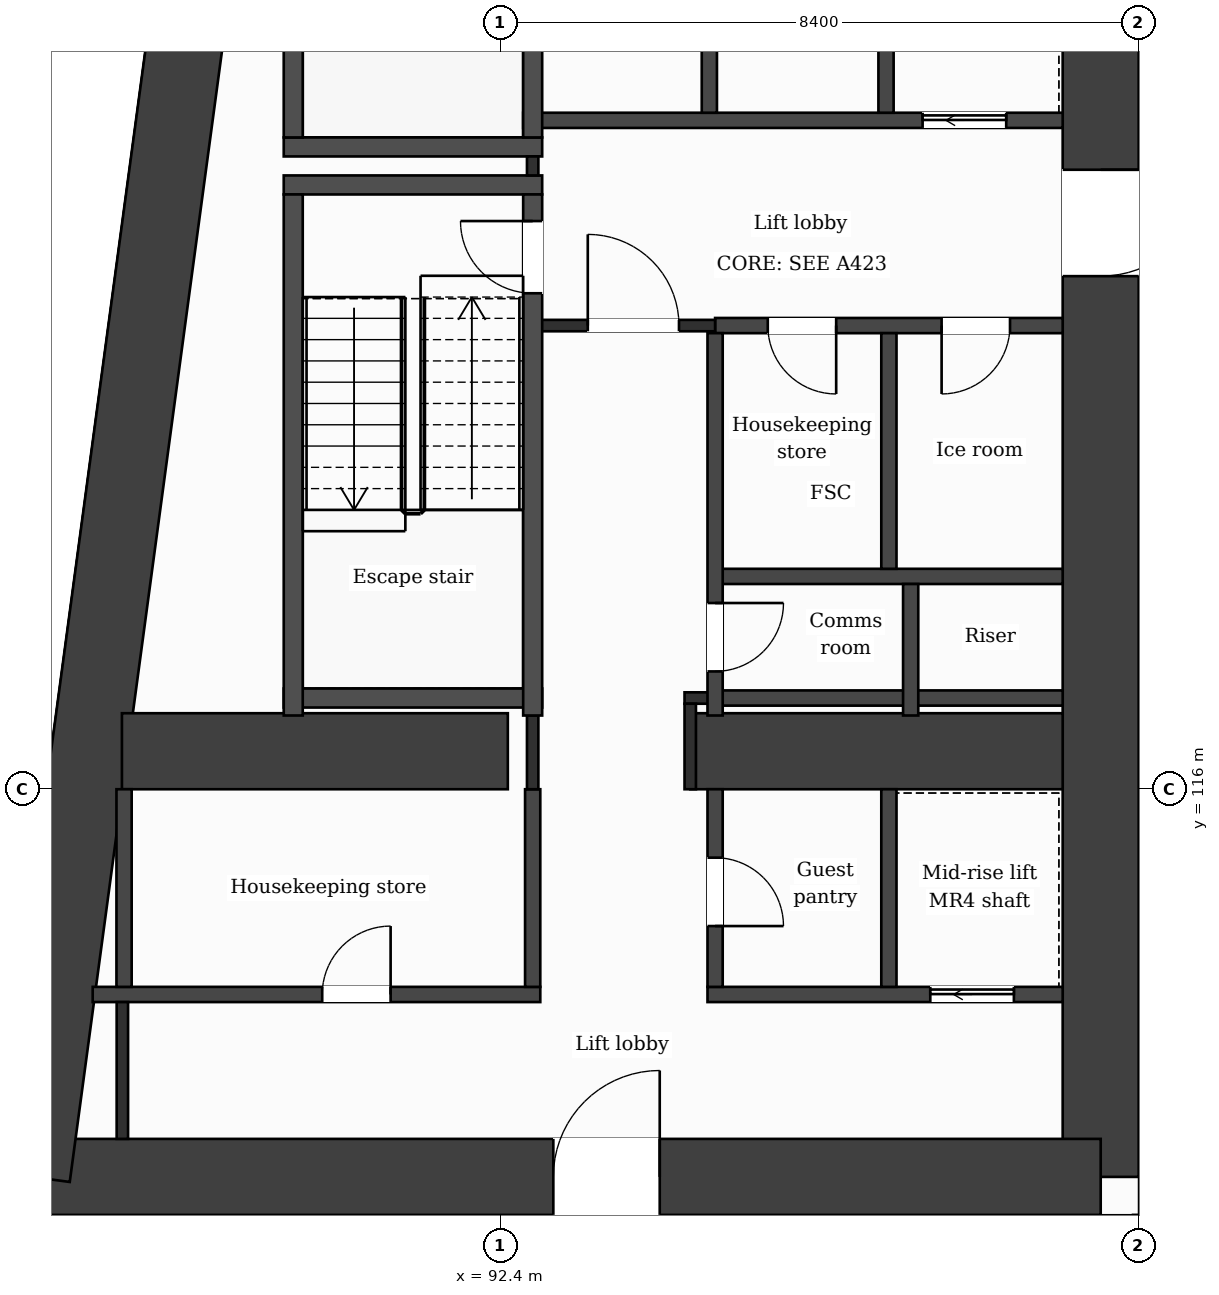
"""IFC4 building model, lengths in metres.
Left out: names, types, materials, properties, quantities, classifications, styles, units other than length and angle.
Written with IfcOpenShell. Run it as: python <this file> out.ifc"""

import sys

from ifc_helpers import new_model, si_unit, direction, frame, frame_2d, origin, place, context, subcontext, project, spatial, rectangle, extrude, element, fill, save


model = new_model("IFC4")
c1 = context("Model", 3, precision=1e-05, world=origin(), true_north=direction((0.0, 1.0)))
c2 = subcontext(c1, "Body", "Model", "MODEL_VIEW")
j1 = project(units=[si_unit("LENGTHUNIT", "METRE"), si_unit("PLANEANGLEUNIT", "RADIAN")], contexts=[c1])
p1 = place(None, origin())
s1 = spatial("IfcSite", under=j1, at=p1, CompositionType="ELEMENT")
p2 = place(p1, origin())
s2 = spatial("IfcBuilding", under=s1, at=p2, CompositionType="ELEMENT")
p3 = place(p2, frame((0.0, 0.0, 98.4)))
s3 = spatial("IfcBuildingStorey", under=s2, at=p3, CompositionType="ELEMENT", Elevation=98.4)
p4 = place(p3, frame((100.3, 131.9, 0.0), z_axis=(0.0, 0.0, 1.0), x_axis=(0.0, -1.0, 0.0)))
e1 = element("IfcWall", 1, at=p4, inside=s3, PredefinedType="SHEAR", context=c2, shape_type="SweptSolid", body=[
    extrude(rectangle(XDim=21.0, YDim=1.0, at=frame_2d((10.5, 0.0))), origin(), (0.0, 0.0, 1.0), 3.7),
])
p5 = place(p4, frame((7.75, 0.0, 0.0)))
e2 = element("IfcOpeningElement", 2, at=p5, cuts=e1, PredefinedType="OPENING", context=c2, shape_type="SweptSolid", body=[
    extrude(rectangle(XDim=1.4, YDim=2.1, at=frame_2d((0.7, 1.05))), frame((0.0, 0.51, 0.0), z_axis=(0.0, -1.0, 0.0), x_axis=(1.0, 0.0, 0.0)), (0.0, 0.0, 1.0), 1.02),
])
p6 = place(p3, frame((100.3, 110.9, 0.0), z_axis=(0.0, 0.0, 1.0), x_axis=(-1.0, 0.0, 0.0)))
e3 = element("IfcWall", 3, at=p6, inside=s3, PredefinedType="SHEAR", context=c2, shape_type="SweptSolid", body=[
    extrude(rectangle(XDim=14.059, YDim=1.0, at=frame_2d((7.03, 0.0))), origin(), (0.0, 0.0, 1.0), 3.7),
])
p7 = place(p6, frame((5.802, 0.0, 0.0)))
e4 = element("IfcOpeningElement", 4, at=p7, cuts=e3, PredefinedType="OPENING", context=c2, shape_type="SweptSolid", body=[
    extrude(rectangle(XDim=1.4, YDim=2.1, at=frame_2d((0.7, 1.05))), frame((0.0, 0.51, 0.0), z_axis=(0.0, -1.0, 0.0), x_axis=(1.0, 0.0, 0.0)), (0.0, 0.0, 1.0), 1.02),
])
p8 = place(p3, frame((86.241, 110.9, 0.0), z_axis=(0.0, 0.0, 1.0), x_axis=(0.133411141623, 0.991060778808, 0.0)))
e5 = element("IfcWall", 5, at=p8, inside=s3, PredefinedType="SHEAR", context=c2, shape_type="SweptSolid", body=[
    extrude(rectangle(XDim=21.189, YDim=1.0, at=frame_2d((10.595, 0.0))), origin(), (0.0, 0.0, 1.0), 3.7),
])
p9 = place(p3, frame((87.423, 116.5, 0.0), z_axis=(0.0, 0.0, 1.0), x_axis=(1.0, 0.0, 0.0)))
e6 = element("IfcWall", 6, at=p9, inside=s3, PredefinedType="SHEAR", context=c2, shape_type="SweptSolid", body=[
    extrude(rectangle(XDim=5.077, YDim=1.0, at=frame_2d((2.539, 0.0))), origin(), (0.0, 0.0, 1.0), 3.7),
])
p10 = place(p3, frame((94.9, 116.5, 0.0), z_axis=(0.0, 0.0, 1.0), x_axis=(1.0, 0.0, 0.0)))
e7 = element("IfcWall", 7, at=p10, inside=s3, PredefinedType="SHEAR", context=c2, shape_type="SweptSolid", body=[
    extrude(rectangle(XDim=4.9, YDim=1.0, at=frame_2d((2.45, 0.0))), origin(), (0.0, 0.0, 1.0), 3.7),
])
p11 = place(p3, frame((87.334, 110.4, 0.0), z_axis=(0.0, 0.0, 1.0), x_axis=(-0.133437175554, -0.991057273915, 0.0)))
e8 = element("IfcWall", 8, at=p11, inside=s3, PredefinedType="SOLIDWALL", context=c2, shape_type="SweptSolid", body=[
    extrude(rectangle(XDim=6.781, YDim=0.3, at=frame_2d((3.39, 0.0))), origin(), (0.0, 0.0, 1.0), 3.38),
])
p12 = place(p11, frame((1.418, 0.0, 0.0)))
e9 = element("IfcOpeningElement", 9, at=p12, cuts=e8, PredefinedType="OPENING", context=c2, shape_type="SweptSolid", body=[
    extrude(rectangle(XDim=1.2, YDim=2.4, at=frame_2d((0.6, 1.2))), frame((0.0, 0.16, 0.0), z_axis=(0.0, -1.0, 0.0), x_axis=(1.0, 0.0, 0.0)), (0.0, 0.0, 1.0), 0.32),
])
p13 = place(p11, frame((4.758, 0.0, 0.9)))
e10 = element("IfcOpeningElement", 10, at=p13, cuts=e8, PredefinedType="OPENING", context=c2, shape_type="SweptSolid", body=[
    extrude(rectangle(XDim=1.2, YDim=2.1, at=frame_2d((0.6, 1.05))), frame((0.0, 0.16, 0.0), z_axis=(0.0, -1.0, 0.0), x_axis=(1.0, 0.0, 0.0)), (0.0, 0.0, 1.0), 0.32),
])
p14 = place(p3, frame((87.039, 113.3, 0.0), z_axis=(0.0, 0.0, 1.0), x_axis=(1.0, 0.0, 0.0)))
e11 = element("IfcWall", 11, at=p14, inside=s3, PredefinedType="PARTITIONING", context=c2, shape_type="SweptSolid", body=[
    extrude(rectangle(XDim=5.888, YDim=0.2, at=frame_2d((2.944, 0.0))), origin(), (0.0, 0.0, 1.0), 3.38),
])
p15 = place(p14, frame((3.019, 0.0, 0.0)))
e12 = element("IfcOpeningElement", 12, at=p15, cuts=e11, PredefinedType="OPENING", context=c2, shape_type="SweptSolid", body=[
    extrude(rectangle(XDim=0.9, YDim=2.1, at=frame_2d((0.45, 1.05))), frame((0.0, 0.11, 0.0), z_axis=(0.0, -1.0, 0.0), x_axis=(1.0, 0.0, 0.0)), (0.0, 0.0, 1.0), 0.22),
])
p16 = place(p3, frame((95.127, 113.3, 0.0), z_axis=(0.0, 0.0, 1.0), x_axis=(1.0, 0.0, 0.0)))
e13 = element("IfcWall", 13, at=p16, inside=s3, PredefinedType="PARTITIONING", context=c2, shape_type="SweptSolid", body=[
    extrude(rectangle(XDim=4.673, YDim=0.2, at=frame_2d((2.336, 0.0))), origin(), (0.0, 0.0, 1.0), 3.38),
])
p17 = place(p16, frame((2.931, 0.0, 0.0)))
e14 = element("IfcOpeningElement", 14, at=p17, cuts=e13, PredefinedType="OPENING", context=c2, shape_type="SweptSolid", body=[
    extrude(rectangle(XDim=1.1, YDim=2.1, at=frame_2d((0.55, 1.05))), frame((0.0, 0.11, 0.0), z_axis=(0.0, -1.0, 0.0), x_axis=(1.0, 0.0, 0.0)), (0.0, 0.0, 1.0), 0.22),
])
p18 = place(p3, frame((95.227, 117.2, 0.0), z_axis=(0.0, 0.0, 1.0), x_axis=(1.0, 0.0, 0.0)))
e15 = element("IfcWall", 15, at=p18, inside=s3, PredefinedType="PARTITIONING", context=c2, shape_type="SweptSolid", body=[
    extrude(rectangle(XDim=4.573, YDim=0.2, at=frame_2d((2.287, 0.0))), origin(), (0.0, 0.0, 1.0), 3.38),
])
p19 = place(p3, frame((94.825, 117.2, 0.0), z_axis=(0.0, 0.0, 1.0), x_axis=(1.0, 0.0, 0.0)))
e16 = element("IfcWall", 16, at=p19, inside=s3, PredefinedType="PARTITIONING", context=c2, shape_type="SweptSolid", body=[
    extrude(rectangle(XDim=0.402, YDim=0.15, at=frame_2d((0.201, 0.0))), origin(), (0.0, 0.0, 1.0), 3.38),
])
p20 = place(p3, frame((89.552, 117.2, 0.0), z_axis=(0.0, 0.0, 1.0), x_axis=(1.0, 0.0, 0.0)))
e17 = element("IfcWall", 17, at=p20, inside=s3, PredefinedType="PARTITIONING", context=c2, shape_type="SweptSolid", body=[
    extrude(rectangle(XDim=3.4, YDim=0.25, at=frame_2d((1.7, 0.0))), origin(), (0.0, 0.0, 1.0), 3.38),
])
p21 = place(p3, frame((95.227, 118.8, 0.0), z_axis=(0.0, 0.0, 1.0), x_axis=(1.0, 0.0, 0.0)))
e18 = element("IfcWall", 18, at=p21, inside=s3, PredefinedType="PARTITIONING", context=c2, shape_type="SweptSolid", body=[
    extrude(rectangle(XDim=4.573, YDim=0.2, at=frame_2d((2.287, 0.0))), origin(), (0.0, 0.0, 1.0), 3.38),
])
p22 = place(p3, frame((95.227, 122.1, 0.0), z_axis=(0.0, 0.0, 1.0), x_axis=(1.0, 0.0, 0.0)))
e19 = element("IfcWall", 19, at=p22, inside=s3, PredefinedType="PARTITIONING", context=c2, shape_type="SweptSolid", body=[
    extrude(rectangle(XDim=4.573, YDim=0.2, at=frame_2d((2.287, 0.0))), origin(), (0.0, 0.0, 1.0), 3.38),
])
p23 = place(p22, frame((0.693, 0.0, 0.0)))
e20 = element("IfcOpeningElement", 20, at=p23, cuts=e19, PredefinedType="OPENING", context=c2, shape_type="SweptSolid", body=[
    extrude(rectangle(XDim=0.9, YDim=2.1, at=frame_2d((0.45, 1.05))), frame((0.0, 0.11, 0.0), z_axis=(0.0, -1.0, 0.0), x_axis=(1.0, 0.0, 0.0)), (0.0, 0.0, 1.0), 0.22),
])
p24 = place(p22, frame((2.98, 0.0, 0.0)))
e21 = element("IfcOpeningElement", 21, at=p24, cuts=e19, PredefinedType="OPENING", context=c2, shape_type="SweptSolid", body=[
    extrude(rectangle(XDim=0.9, YDim=2.1, at=frame_2d((0.45, 1.05))), frame((0.0, 0.11, 0.0), z_axis=(0.0, -1.0, 0.0), x_axis=(1.0, 0.0, 0.0)), (0.0, 0.0, 1.0), 0.22),
])
p25 = place(p3, frame((92.827, 122.1, 0.0), z_axis=(0.0, 0.0, 1.0), x_axis=(1.0, 0.0, 0.0)))
e22 = element("IfcWall", 22, at=p25, inside=s3, PredefinedType="PARTITIONING", context=c2, shape_type="SweptSolid", body=[
    extrude(rectangle(XDim=2.4, YDim=0.15, at=frame_2d((1.2, 0.0))), origin(), (0.0, 0.0, 1.0), 3.38),
])
p26 = place(p25, frame((0.725, 0.0, 0.0)))
e23 = element("IfcOpeningElement", 23, at=p26, cuts=e22, PredefinedType="OPENING", context=c2, shape_type="SweptSolid", body=[
    extrude(rectangle(XDim=1.2, YDim=2.1, at=frame_2d((0.6, 1.05))), frame((0.0, 0.085, 0.0), z_axis=(0.0, -1.0, 0.0), x_axis=(1.0, 0.0, 0.0)), (0.0, 0.0, 1.0), 0.17),
])
for number, where, z_axis, x_axis in (
    (24, (89.552, 123.95, 0.0), (0.0, 0.0, 1.0), (1.0, 0.0, 0.0)),
    (25, (89.552, 124.45, 0.0), (0.0, 0.0, 1.0), (1.0, 0.0, 0.0)),
):
    element("IfcWall", number, at=place(p3, frame(where, z_axis=z_axis, x_axis=x_axis)), inside=s3, PredefinedType="PARTITIONING", context=c2, shape_type="SweptSolid", body=[
        extrude(rectangle(XDim=3.4, YDim=0.25, at=frame_2d((1.7, 0.0))), origin(), (0.0, 0.0, 1.0), 3.38),
    ])
p27 = place(p3, frame((92.702, 124.8, 0.0), z_axis=(0.0, 0.0, 1.0), x_axis=(1.0, 0.0, 0.0)))
e26 = element("IfcWall", 26, at=p27, inside=s3, PredefinedType="PARTITIONING", context=c2, shape_type="SweptSolid", body=[
    extrude(rectangle(XDim=7.098, YDim=0.2, at=frame_2d((3.549, 0.0))), origin(), (0.0, 0.0, 1.0), 3.38),
])
p28 = place(p27, frame((5.255, 0.0, 0.0)))
e27 = element("IfcOpeningElement", 27, at=p28, cuts=e26, PredefinedType="OPENING", context=c2, shape_type="SweptSolid", body=[
    extrude(rectangle(XDim=1.1, YDim=2.1, at=frame_2d((0.55, 1.05))), frame((0.0, 0.11, 0.0), z_axis=(0.0, -1.0, 0.0), x_axis=(1.0, 0.0, 0.0)), (0.0, 0.0, 1.0), 0.22),
])
p29 = place(p3, frame((87.451, 113.4, 0.0), z_axis=(0.0, 0.0, 1.0), x_axis=(0.0, 1.0, 0.0)))
e28 = element("IfcWall", 28, at=p29, inside=s3, PredefinedType="PARTITIONING", context=c2, shape_type="SweptSolid", body=[
    extrude(rectangle(XDim=2.6, YDim=0.2, at=frame_2d((1.3, 0.0))), origin(), (0.0, 0.0, 1.0), 3.38),
])
p30 = place(p3, frame((87.429, 111.4, 0.0), z_axis=(0.0, 0.0, 1.0), x_axis=(0.0, 1.0, 0.0)))
e29 = element("IfcWall", 29, at=p30, inside=s3, PredefinedType="PARTITIONING", context=c2, shape_type="SweptSolid", body=[
    extrude(rectangle(XDim=1.8, YDim=0.15, at=frame_2d((0.9, 0.0))), origin(), (0.0, 0.0, 1.0), 3.38),
])
for number, where, z_axis, x_axis in (
    (30, (89.677, 116.97, 0.0), (0.0, 0.0, 1.0), (0.0, 1.0, 0.0)),
    (31, (89.677, 124.575, 0.0), (0.0, 0.0, 1.0), (0.0, 1.0, 0.0)),
):
    element("IfcWall", number, at=place(p3, frame(where, z_axis=z_axis, x_axis=x_axis)), inside=s3, PredefinedType="PARTITIONING", context=c2, shape_type="SweptSolid", body=[
        extrude(rectangle(XDim=6.855, YDim=0.25, at=frame_2d((3.427, 0.0))), origin(), (0.0, 0.0, 1.0), 3.38),
    ])
p31 = place(p3, frame((92.827, 113.4, 0.0), z_axis=(0.0, 0.0, 1.0), x_axis=(0.0, 1.0, 0.0)))
e32 = element("IfcWall", 32, at=p31, inside=s3, PredefinedType="PARTITIONING", context=c2, shape_type="SweptSolid", body=[
    extrude(rectangle(XDim=2.6, YDim=0.2, at=frame_2d((1.3, 0.0))), origin(), (0.0, 0.0, 1.0), 3.38),
])
p32 = place(p3, frame((92.827, 116.0, 0.0), z_axis=(0.0, 0.0, 1.0), x_axis=(0.0, 1.0, 0.0)))
e33 = element("IfcWall", 33, at=p32, inside=s3, PredefinedType="PARTITIONING", context=c2, shape_type="SweptSolid", body=[
    extrude(rectangle(XDim=0.97, YDim=0.15, at=frame_2d((0.485, 0.0))), origin(), (0.0, 0.0, 1.0), 3.38),
])
p33 = place(p3, frame((92.827, 124.075, 0.0), z_axis=(0.0, 0.0, 1.0), x_axis=(0.0, 1.0, 0.0)))
e34 = element("IfcWall", 34, at=p33, inside=s3, PredefinedType="PARTITIONING", context=c2, shape_type="SweptSolid", body=[
    extrude(rectangle(XDim=0.25, YDim=0.15, at=frame_2d((0.125, 0.0))), origin(), (0.0, 0.0, 1.0), 3.38),
])
p34 = place(p3, frame((92.827, 116.97, 0.0), z_axis=(0.0, 0.0, 1.0), x_axis=(0.0, 1.0, 0.0)))
e35 = element("IfcWall", 35, at=p34, inside=s3, PredefinedType="PARTITIONING", context=c2, shape_type="SweptSolid", body=[
    extrude(rectangle(XDim=6.855, YDim=0.25, at=frame_2d((3.427, 0.0))), origin(), (0.0, 0.0, 1.0), 3.38),
])
p35 = place(p34, frame((5.555, 0.0, 0.0)))
e36 = element("IfcOpeningElement", 36, at=p35, cuts=e35, PredefinedType="OPENING", context=c2, shape_type="SweptSolid", body=[
    extrude(rectangle(XDim=0.95, YDim=2.1, at=frame_2d((0.475, 1.05))), frame((0.0, 0.135, 0.0), z_axis=(0.0, -1.0, 0.0), x_axis=(1.0, 0.0, 0.0)), (0.0, 0.0, 1.0), 0.27),
])
p36 = place(p3, frame((92.827, 124.575, 0.0), z_axis=(0.0, 0.0, 1.0), x_axis=(0.0, 1.0, 0.0)))
e37 = element("IfcWall", 37, at=p36, inside=s3, PredefinedType="PARTITIONING", context=c2, shape_type="SweptSolid", body=[
    extrude(rectangle(XDim=6.855, YDim=0.25, at=frame_2d((3.427, 0.0))), origin(), (0.0, 0.0, 1.0), 3.38),
])
p37 = place(p36, frame((5.325, 0.0, 0.0)))
e38 = element("IfcOpeningElement", 38, at=p37, cuts=e37, PredefinedType="OPENING", context=c2, shape_type="SweptSolid", body=[
    extrude(rectangle(XDim=1.0, YDim=2.1, at=frame_2d((0.5, 1.05))), frame((0.0, 0.135, 0.0), z_axis=(0.0, -1.0, 0.0), x_axis=(1.0, 0.0, 0.0)), (0.0, 0.0, 1.0), 0.27),
])
p38 = place(p3, frame((94.9, 116.0, 0.0), z_axis=(0.0, 0.0, 1.0), x_axis=(0.0, 1.0, 0.0)))
e39 = element("IfcWall", 39, at=p38, inside=s3, PredefinedType="PARTITIONING", context=c2, shape_type="SweptSolid", body=[
    extrude(rectangle(XDim=1.125, YDim=0.15, at=frame_2d((0.562, 0.0))), origin(), (0.0, 0.0, 1.0), 3.38),
])
p39 = place(p3, frame((95.151, 124.9, 0.0), z_axis=(0.0, 0.0, 1.0), x_axis=(0.0, 1.0, 0.0)))
e40 = element("IfcWall", 40, at=p39, inside=s3, PredefinedType="PARTITIONING", context=c2, shape_type="SweptSolid", body=[
    extrude(rectangle(XDim=3.1, YDim=0.2, at=frame_2d((1.55, 0.0))), origin(), (0.0, 0.0, 1.0), 3.38),
])
p40 = place(p3, frame((95.227, 113.4, 0.0), z_axis=(0.0, 0.0, 1.0), x_axis=(0.0, 1.0, 0.0)))
e41 = element("IfcWall", 41, at=p40, inside=s3, PredefinedType="PARTITIONING", context=c2, shape_type="SweptSolid", body=[
    extrude(rectangle(XDim=2.6, YDim=0.2, at=frame_2d((1.3, 0.0))), origin(), (0.0, 0.0, 1.0), 3.38),
])
p41 = place(p40, frame((0.8, 0.0, 0.0)))
e42 = element("IfcOpeningElement", 42, at=p41, cuts=e41, PredefinedType="OPENING", context=c2, shape_type="SweptSolid", body=[
    extrude(rectangle(XDim=0.9, YDim=2.1, at=frame_2d((0.45, 1.05))), frame((0.0, 0.11, 0.0), z_axis=(0.0, -1.0, 0.0), x_axis=(1.0, 0.0, 0.0)), (0.0, 0.0, 1.0), 0.22),
])
p42 = place(p3, frame((95.227, 116.97, 0.0), z_axis=(0.0, 0.0, 1.0), x_axis=(0.0, 1.0, 0.0)))
e43 = element("IfcWall", 43, at=p42, inside=s3, PredefinedType="PARTITIONING", context=c2, shape_type="SweptSolid", body=[
    extrude(rectangle(XDim=5.03, YDim=0.2, at=frame_2d((2.515, 0.0))), origin(), (0.0, 0.0, 1.0), 3.38),
])
p43 = place(p42, frame((0.58, 0.0, 0.0)))
e44 = element("IfcOpeningElement", 44, at=p43, cuts=e43, PredefinedType="OPENING", context=c2, shape_type="SweptSolid", body=[
    extrude(rectangle(XDim=0.9, YDim=2.1, at=frame_2d((0.45, 1.05))), frame((0.0, 0.11, 0.0), z_axis=(0.0, -1.0, 0.0), x_axis=(1.0, 0.0, 0.0)), (0.0, 0.0, 1.0), 0.22),
])
p44 = place(p3, frame((97.476, 124.9, 0.0), z_axis=(0.0, 0.0, 1.0), x_axis=(0.0, 1.0, 0.0)))
e45 = element("IfcWall", 45, at=p44, inside=s3, PredefinedType="PARTITIONING", context=c2, shape_type="SweptSolid", body=[
    extrude(rectangle(XDim=3.1, YDim=0.2, at=frame_2d((1.55, 0.0))), origin(), (0.0, 0.0, 1.0), 3.38),
])
p45 = place(p3, frame((97.513, 113.4, 0.0), z_axis=(0.0, 0.0, 1.0), x_axis=(0.0, 1.0, 0.0)))
e46 = element("IfcWall", 46, at=p45, inside=s3, PredefinedType="PARTITIONING", context=c2, shape_type="SweptSolid", body=[
    extrude(rectangle(XDim=2.6, YDim=0.2, at=frame_2d((1.3, 0.0))), origin(), (0.0, 0.0, 1.0), 3.38),
])
p46 = place(p3, frame((97.513, 118.9, 0.0), z_axis=(0.0, 0.0, 1.0), x_axis=(0.0, 1.0, 0.0)))
e47 = element("IfcWall", 47, at=p46, inside=s3, PredefinedType="PARTITIONING", context=c2, shape_type="SweptSolid", body=[
    extrude(rectangle(XDim=3.1, YDim=0.2, at=frame_2d((1.55, 0.0))), origin(), (0.0, 0.0, 1.0), 3.38),
])
p47 = place(p3, frame((97.8, 116.97, 0.0), z_axis=(0.0, 0.0, 1.0), x_axis=(0.0, 1.0, 0.0)))
e48 = element("IfcWall", 48, at=p47, inside=s3, PredefinedType="PARTITIONING", context=c2, shape_type="SweptSolid", body=[
    extrude(rectangle(XDim=1.73, YDim=0.2, at=frame_2d((0.865, 0.0))), origin(), (0.0, 0.0, 1.0), 3.38),
])
p48 = place(p3, frame((100.8, 109.075, 0.0), z_axis=(0.0, 0.0, 1.0), x_axis=(0.0, 1.0, 0.0)))
e49 = element("IfcWall", 49, at=p48, inside=s3, PredefinedType="PARTITIONING", context=c2, shape_type="SweptSolid", body=[
    extrude(rectangle(XDim=1.325, YDim=0.15, at=frame_2d((0.663, 0.0))), origin(), (0.0, 0.0, 1.0), 3.38),
])
p49 = place(p26, origin())
e50 = element("IfcDoor", 50, at=p49, inside=s3, OperationType="SINGLE_SWING_LEFT", PredefinedType="DOOR", context=c2, shape_type="SweptSolid", body=[
    extrude(rectangle(XDim=1.2, YDim=2.1, at=frame_2d((0.6, 1.05))), frame((0.0, 0.025, 0.0), z_axis=(0.0, -1.0, 0.0), x_axis=(1.0, 0.0, 0.0)), (0.0, 0.0, 1.0), 0.05),
])
fill(e23, e50)
p50 = place(p28, origin())
e51 = element("IfcDoor", 51, at=p50, inside=s3, OperationType="SLIDING_TO_LEFT", PredefinedType="DOOR", context=c2, shape_type="SweptSolid", body=[
    extrude(rectangle(XDim=1.1, YDim=2.1, at=frame_2d((0.55, 1.05))), frame((0.0, 0.025, 0.0), z_axis=(0.0, -1.0, 0.0), x_axis=(1.0, 0.0, 0.0)), (0.0, 0.0, 1.0), 0.05),
])
fill(e27, e51)
p51 = place(p23, origin())
e52 = element("IfcDoor", 52, at=p51, inside=s3, OperationType="SINGLE_SWING_RIGHT", PredefinedType="DOOR", context=c2, shape_type="SweptSolid", body=[
    extrude(rectangle(XDim=0.9, YDim=2.1, at=frame_2d((0.45, 1.05))), frame((0.0, 0.025, 0.0), z_axis=(0.0, -1.0, 0.0), x_axis=(1.0, 0.0, 0.0)), (0.0, 0.0, 1.0), 0.05),
])
fill(e20, e52)
p52 = place(p24, origin())
e53 = element("IfcDoor", 53, at=p52, inside=s3, OperationType="SINGLE_SWING_LEFT", PredefinedType="DOOR", context=c2, shape_type="SweptSolid", body=[
    extrude(rectangle(XDim=0.9, YDim=2.1, at=frame_2d((0.45, 1.05))), frame((0.0, 0.025, 0.0), z_axis=(0.0, -1.0, 0.0), x_axis=(1.0, 0.0, 0.0)), (0.0, 0.0, 1.0), 0.05),
])
fill(e21, e53)
p53 = place(p35, origin())
e54 = element("IfcDoor", 54, at=p53, inside=s3, OperationType="SINGLE_SWING_RIGHT", PredefinedType="DOOR", context=c2, shape_type="SweptSolid", body=[
    extrude(rectangle(XDim=0.95, YDim=2.1, at=frame_2d((0.475, 1.05))), frame((0.0, 0.025, 0.0), z_axis=(0.0, -1.0, 0.0), x_axis=(1.0, 0.0, 0.0)), (0.0, 0.0, 1.0), 0.05),
])
fill(e36, e54)
p54 = place(p43, origin())
e55 = element("IfcDoor", 55, at=p54, inside=s3, OperationType="SINGLE_SWING_RIGHT", PredefinedType="DOOR", context=c2, shape_type="SweptSolid", body=[
    extrude(rectangle(XDim=0.9, YDim=2.1, at=frame_2d((0.45, 1.05))), frame((0.0, 0.025, 0.0), z_axis=(0.0, -1.0, 0.0), x_axis=(1.0, 0.0, 0.0)), (0.0, 0.0, 1.0), 0.05),
])
fill(e44, e55)
p55 = place(p17, origin())
e56 = element("IfcDoor", 56, at=p55, inside=s3, OperationType="SLIDING_TO_LEFT", PredefinedType="DOOR", context=c2, shape_type="SweptSolid", body=[
    extrude(rectangle(XDim=1.1, YDim=2.1, at=frame_2d((0.55, 1.05))), frame((0.0, 0.025, 0.0), z_axis=(0.0, -1.0, 0.0), x_axis=(1.0, 0.0, 0.0)), (0.0, 0.0, 1.0), 0.05),
])
fill(e14, e56)
p56 = place(p15, origin())
e57 = element("IfcDoor", 57, at=p56, inside=s3, OperationType="SINGLE_SWING_RIGHT", PredefinedType="DOOR", context=c2, shape_type="SweptSolid", body=[
    extrude(rectangle(XDim=0.9, YDim=2.1, at=frame_2d((0.45, 1.05))), frame((0.0, 0.025, 0.0), z_axis=(0.0, -1.0, 0.0), x_axis=(1.0, 0.0, 0.0)), (0.0, 0.0, 1.0), 0.05),
])
fill(e12, e57)
p57 = place(p41, origin())
e58 = element("IfcDoor", 58, at=p57, inside=s3, OperationType="SINGLE_SWING_LEFT", PredefinedType="DOOR", context=c2, shape_type="SweptSolid", body=[
    extrude(rectangle(XDim=0.9, YDim=2.1, at=frame_2d((0.45, 1.05))), frame((0.0, 0.025, 0.0), z_axis=(0.0, -1.0, 0.0), x_axis=(1.0, 0.0, 0.0)), (0.0, 0.0, 1.0), 0.05),
])
fill(e42, e58)
p58 = place(p7, origin())
e59 = element("IfcDoor", 59, at=p58, inside=s3, OperationType="SINGLE_SWING_LEFT", PredefinedType="DOOR", context=c2, shape_type="SweptSolid", body=[
    extrude(rectangle(XDim=1.4, YDim=2.1, at=frame_2d((0.7, 1.05))), frame((0.0, 0.025, 0.0), z_axis=(0.0, -1.0, 0.0), x_axis=(1.0, 0.0, 0.0)), (0.0, 0.0, 1.0), 0.05),
])
fill(e4, e59)
p59 = place(p5, origin())
e60 = element("IfcDoor", 60, at=p59, inside=s3, OperationType="SINGLE_SWING_LEFT", PredefinedType="DOOR", context=c2, shape_type="SweptSolid", body=[
    extrude(rectangle(XDim=1.4, YDim=2.1, at=frame_2d((0.7, 1.05))), frame((0.0, 0.025, 0.0), z_axis=(0.0, -1.0, 0.0), x_axis=(1.0, 0.0, 0.0)), (0.0, 0.0, 1.0), 0.05),
])
fill(e2, e60)
save(model, sys.argv[1])
